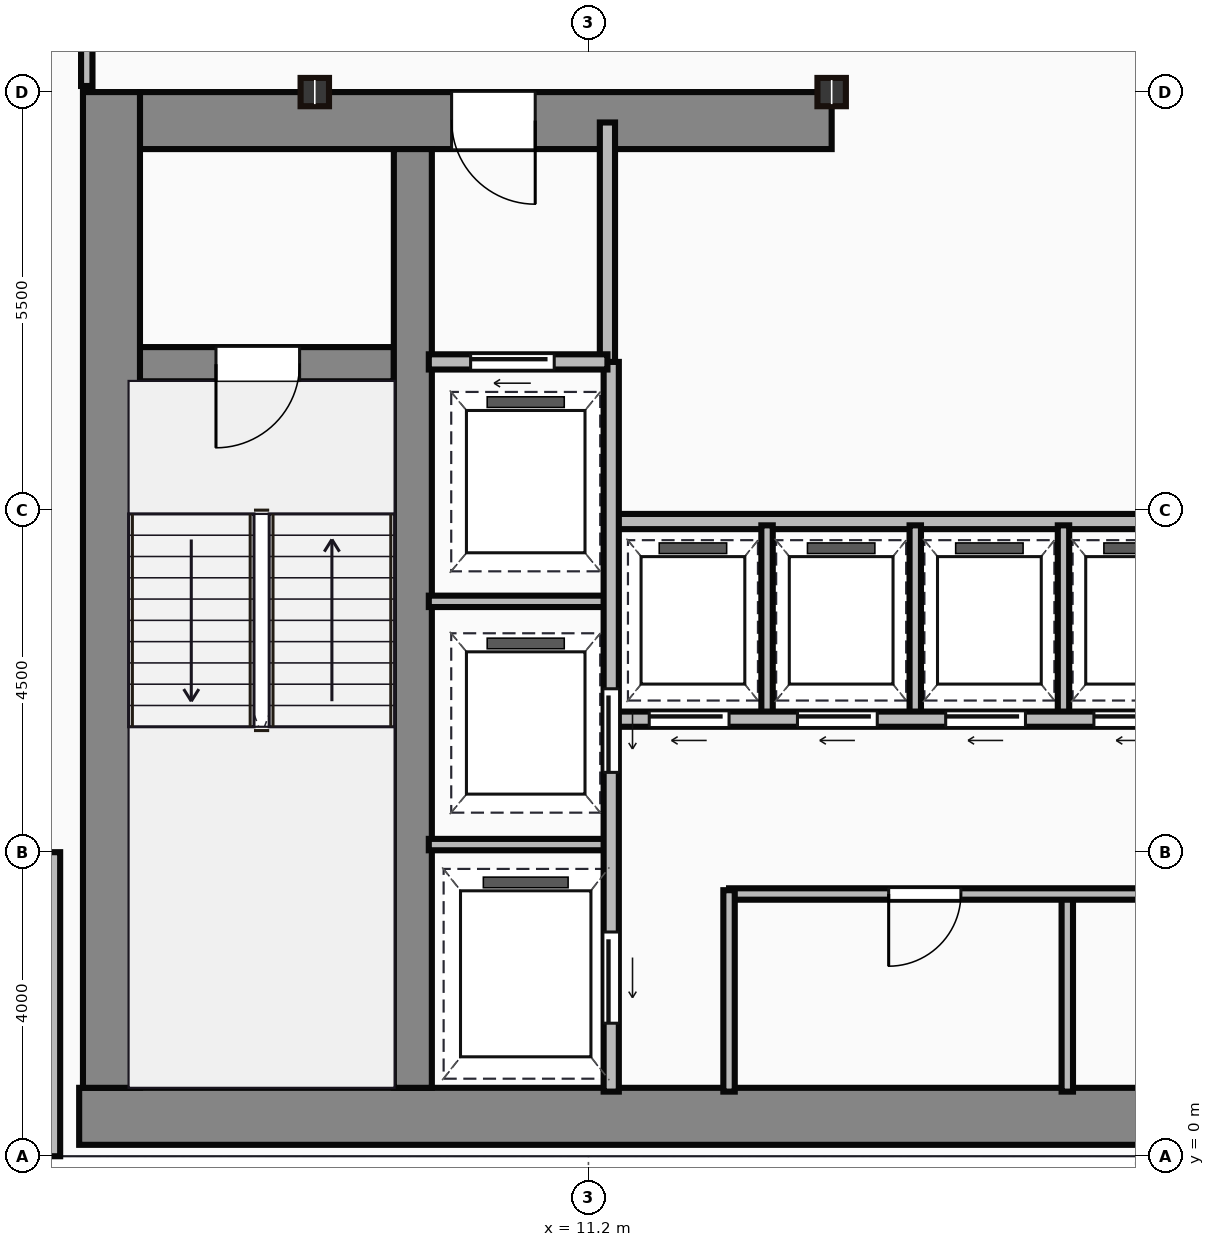
"""IFC4 building model, lengths in metres.
Left out: names, types, materials, properties, quantities, classifications, styles, units other than length and angle.
Written with IfcOpenShell. Run it as: python <this file> out.ifc"""

import sys

from ifc_helpers import new_model, si_unit, direction, frame, frame_2d, origin, origin_2d, place, context, subcontext, project, spatial, rectangle, i_section, extrude, source, transform, mapped, element, fill, save


model = new_model("IFC4")
c1 = context("Model", 3, precision=1e-05, world=origin(), true_north=direction((0.0, 1.0)))
c2 = subcontext(c1, "Body", "Model", "MODEL_VIEW")
j1 = project(units=[si_unit("LENGTHUNIT", "METRE"), si_unit("PLANEANGLEUNIT", "RADIAN")], contexts=[c1])
p1 = place(None, origin())
s1 = spatial("IfcSite", under=j1, at=p1, CompositionType="ELEMENT")
p2 = place(p1, origin())
s2 = spatial("IfcBuilding", under=s1, at=p2, CompositionType="ELEMENT")
p3 = place(p2, frame((0.0, 0.0, 144.25)))
s3 = spatial("IfcBuildingStorey", under=s2, at=p3, CompositionType="ELEMENT", Elevation=144.25)
m1 = source(origin(), c2, "Body", "SweptSolid", [
    extrude(rectangle(XDim=29.5, YDim=0.75, at=frame_2d((14.75, 0.0))), origin(), (0.0, 0.0, 1.0), 3.65),
])
p4 = place(p3, frame((4.5, 0.525, 0.0), z_axis=(0.0, 0.0, 1.0), x_axis=(1.0, 0.0, 0.0)))
e1 = element("IfcWall", 1, at=p4, inside=s3, PredefinedType="SHEAR", context=c2, shape_type="MappedRepresentation", body=[
    mapped(m1, transform((0.0, 0.0, 0.0))),
])
m2 = source(origin(), c2, "Body", "SweptSolid", [
    extrude(rectangle(XDim=13.1, YDim=0.75, at=frame_2d((6.55, 0.0))), origin(), (0.0, 0.0, 1.0), 3.65),
])
p5 = place(p3, frame((4.925, 0.9, 0.0), z_axis=(0.0, 0.0, 1.0), x_axis=(0.0, 1.0, 0.0)))
e2 = element("IfcWall", 2, at=p5, inside=s3, PredefinedType="SHEAR", context=c2, shape_type="MappedRepresentation", body=[
    mapped(m2, transform((0.0, 0.0, 0.0))),
])
m3 = source(origin(), c2, "Body", "SweptSolid", [
    extrude(rectangle(XDim=9.1, YDim=0.75, at=frame_2d((4.55, 0.0))), origin(), (0.0, 0.0, 1.0), 3.65),
])
p6 = place(p3, frame((5.3, 13.625, 0.0), z_axis=(0.0, 0.0, 1.0), x_axis=(1.0, 0.0, 0.0)))
e3 = element("IfcWall", 3, at=p6, inside=s3, PredefinedType="SHEAR", context=c2, shape_type="MappedRepresentation", body=[
    mapped(m3, transform((0.0, 0.0, 0.0))),
])
p7 = place(p6, frame((4.1, 0.0, 0.0)))
e4 = element("IfcOpeningElement", 4, at=p7, cuts=e3, PredefinedType="OPENING", context=c2, shape_type="SweptSolid", body=[
    extrude(rectangle(XDim=1.1, YDim=2.15, at=frame_2d((0.55, 1.075))), frame((0.0, 0.385, 0.0), z_axis=(0.0, -1.0, 0.0), x_axis=(1.0, 0.0, 0.0)), (0.0, 0.0, 1.0), 0.77),
])
m4 = source(origin(), c2, "Body", "SweptSolid", [
    extrude(rectangle(XDim=12.35, YDim=0.5, at=frame_2d((6.175, 0.0))), origin(), (0.0, 0.0, 1.0), 3.65),
])
p8 = place(p3, frame((8.89, 0.9, 0.0), z_axis=(0.0, 0.0, 1.0), x_axis=(0.0, 1.0, 0.0)))
e5 = element("IfcWall", 5, at=p8, inside=s3, PredefinedType="SHEAR", context=c2, shape_type="MappedRepresentation", body=[
    mapped(m4, transform((0.0, 0.0, 0.0))),
])
m5 = source(origin(), c2, "Body", "SweptSolid", [
    extrude(rectangle(XDim=3.39, YDim=0.45, at=frame_2d((1.695, 0.0))), origin(), (0.0, 0.0, 1.0), 3.65),
])
p9 = place(p3, frame((5.25, 10.42, 0.0), z_axis=(0.0, 0.0, 1.0), x_axis=(1.0, 0.0, 0.0)))
e6 = element("IfcWall", 6, at=p9, inside=s3, PredefinedType="SHEAR", context=c2, shape_type="MappedRepresentation", body=[
    mapped(m5, transform((0.0, 0.0, 0.0))),
])
p10 = place(p9, frame((1.05, 0.0, 0.0)))
e7 = element("IfcOpeningElement", 7, at=p10, cuts=e6, PredefinedType="OPENING", context=c2, shape_type="SweptSolid", body=[
    extrude(rectangle(XDim=1.1, YDim=2.15, at=frame_2d((0.55, 1.075))), frame((0.0, 0.235, 0.0), z_axis=(0.0, -1.0, 0.0), x_axis=(1.0, 0.0, 0.0)), (0.0, 0.0, 1.0), 0.47),
])
m6 = source(origin(), c2, "Body", "SweptSolid", [
    extrude(i_section(OverallWidth=0.374, OverallDepth=0.372, WebThickness=0.016, FlangeThickness=0.026, at=origin_2d()), origin(), (0.0, 0.0, 1.0), 3.65),
])
for number, where, z_axis, x_axis in (
    (8, (7.6, 14.0, 0.0), (0.0, 0.0, 1.0), (1.0, 0.0, 0.0)),
    (9, (14.4, 14.0, 0.0), (0.0, 0.0, 1.0), (1.0, 0.0, 0.0)),
):
    element("IfcColumn", number, at=place(p3, frame(where, z_axis=z_axis, x_axis=x_axis)), inside=s3, PredefinedType="COLUMN", context=c2, shape_type="MappedRepresentation", body=[
        mapped(m6, transform((0.0, 0.0, 0.0))),
    ])
m7 = source(origin(), c2, "Body", "SweptSolid", [
    extrude(rectangle(XDim=4.0, YDim=0.25, at=frame_2d((2.0, 0.0))), origin(), (0.0, 0.0, 1.0), 3.4),
])
p11 = place(p3, frame((4.125, 4.0, 0.0), z_axis=(0.0, 0.0, 1.0), x_axis=(0.0, -1.0, 0.0)))
e10 = element("IfcWall", 10, at=p11, inside=s3, PredefinedType="STANDARD", context=c2, shape_type="MappedRepresentation", body=[
    mapped(m7, transform((0.0, 0.0, 0.0))),
])
m8 = source(origin(), c2, "Body", "SweptSolid", [
    extrude(rectangle(XDim=3.18, YDim=0.2, at=frame_2d((1.59, 0.0))), origin(), (0.0, 0.0, 1.0), 3.4),
])
p12 = place(p3, frame((11.45, 10.42, 0.0), z_axis=(0.0, 0.0, 1.0), x_axis=(0.0, 1.0, 0.0)))
e11 = element("IfcWall", 11, at=p12, inside=s3, PredefinedType="PARTITIONING", context=c2, shape_type="MappedRepresentation", body=[
    mapped(m8, transform((0.0, 0.0, 0.0))),
])
m9 = source(origin(), c2, "Body", "SweptSolid", [
    extrude(rectangle(XDim=2.35, YDim=0.2, at=frame_2d((1.175, 0.0))), origin(), (0.0, 0.0, 1.0), 3.4),
])
p13 = place(p3, frame((9.1, 10.45, 0.0), z_axis=(0.0, 0.0, 1.0), x_axis=(1.0, 0.0, 0.0)))
e12 = element("IfcWall", 12, at=p13, inside=s3, PredefinedType="PARTITIONING", context=c2, shape_type="MappedRepresentation", body=[
    mapped(m9, transform((0.0, 0.0, 0.0))),
])
p14 = place(p13, frame((0.55, 0.0, 0.0)))
e13 = element("IfcOpeningElement", 13, at=p14, cuts=e12, PredefinedType="OPENING", context=c2, shape_type="SweptSolid", body=[
    extrude(rectangle(XDim=1.1, YDim=2.15, at=frame_2d((0.55, 1.075))), frame((0.0, 0.11, 0.0), z_axis=(0.0, -1.0, 0.0), x_axis=(1.0, 0.0, 0.0)), (0.0, 0.0, 1.0), 0.22),
])
m10 = source(origin(), c2, "Body", "SweptSolid", [
    extrude(rectangle(XDim=9.6, YDim=0.2, at=frame_2d((4.8, 0.0))), origin(), (0.0, 0.0, 1.0), 3.4),
])
p15 = place(p3, frame((11.5, 0.85, 0.0), z_axis=(0.0, 0.0, 1.0), x_axis=(0.0, 1.0, 0.0)))
e14 = element("IfcWall", 14, at=p15, inside=s3, PredefinedType="PARTITIONING", context=c2, shape_type="MappedRepresentation", body=[
    mapped(m10, transform((0.0, 0.0, 0.0))),
])
p16 = place(p15, frame((4.2, 0.0, 0.0)))
e15 = element("IfcOpeningElement", 15, at=p16, cuts=e14, PredefinedType="OPENING", context=c2, shape_type="SweptSolid", body=[
    extrude(rectangle(XDim=1.1, YDim=2.15, at=frame_2d((0.55, 1.075))), frame((0.0, 0.11, 0.0), z_axis=(0.0, -1.0, 0.0), x_axis=(1.0, 0.0, 0.0)), (0.0, 0.0, 1.0), 0.22),
])
p17 = place(p15, frame((0.9, 0.0, 0.0)))
e16 = element("IfcOpeningElement", 16, at=p17, cuts=e14, PredefinedType="OPENING", context=c2, shape_type="SweptSolid", body=[
    extrude(rectangle(XDim=1.2, YDim=2.15, at=frame_2d((0.6, 1.075))), frame((0.0, 0.11, 0.0), z_axis=(0.0, -1.0, 0.0), x_axis=(1.0, 0.0, 0.0)), (0.0, 0.0, 1.0), 0.22),
])
m11 = source(origin(), c2, "Body", "SweptSolid", [
    extrude(rectangle(XDim=2.4, YDim=0.15, at=frame_2d((1.2, 0.0))), origin(), (0.0, 0.0, 1.0), 3.4),
])
for number, where, z_axis, x_axis in (
    (17, (9.1, 4.1, 0.0), (0.0, 0.0, 1.0), (1.0, 0.0, 0.0)),
    (18, (9.1, 7.3, 0.0), (0.0, 0.0, 1.0), (1.0, 0.0, 0.0)),
):
    element("IfcWall", number, at=place(p3, frame(where, z_axis=z_axis, x_axis=x_axis)), inside=s3, PredefinedType="PARTITIONING", context=c2, shape_type="MappedRepresentation", body=[
        mapped(m11, transform((0.0, 0.0, 0.0))),
    ])
m12 = source(origin(), c2, "Body", "SweptSolid", [
    extrude(rectangle(XDim=2.65, YDim=0.15, at=frame_2d((1.325, 0.0))), origin(), (0.0, 0.0, 1.0), 3.4),
])
p18 = place(p3, frame((13.05, 0.85, 0.0), z_axis=(0.0, 0.0, 1.0), x_axis=(0.0, 1.0, 0.0)))
e19 = element("IfcWall", 19, at=p18, inside=s3, PredefinedType="PARTITIONING", context=c2, shape_type="MappedRepresentation", body=[
    mapped(m12, transform((0.0, 0.0, 0.0))),
])
m13 = source(origin(), c2, "Body", "SweptSolid", [
    extrude(rectangle(XDim=10.35, YDim=0.15, at=frame_2d((5.175, 0.0))), origin(), (0.0, 0.0, 1.0), 3.4),
])
p19 = place(p3, frame((13.05, 3.45, 0.0), z_axis=(0.0, 0.0, 1.0), x_axis=(1.0, 0.0, 0.0)))
e20 = element("IfcWall", 20, at=p19, inside=s3, PredefinedType="PARTITIONING", context=c2, shape_type="MappedRepresentation", body=[
    mapped(m13, transform((0.0, 0.0, 0.0))),
])
p20 = place(p19, frame((2.1, 0.0, 0.0)))
e21 = element("IfcOpeningElement", 21, at=p20, cuts=e20, PredefinedType="OPENING", context=c2, shape_type="SweptSolid", body=[
    extrude(rectangle(XDim=0.95, YDim=2.15, at=frame_2d((0.475, 1.075))), frame((0.0, 0.085, 0.0), z_axis=(0.0, -1.0, 0.0), x_axis=(1.0, 0.0, 0.0)), (0.0, 0.0, 1.0), 0.17),
])
p21 = place(p19, frame((6.8, 0.0, 0.0)))
e22 = element("IfcOpeningElement", 22, at=p21, cuts=e20, PredefinedType="OPENING", context=c2, shape_type="SweptSolid", body=[
    extrude(rectangle(XDim=0.95, YDim=2.15, at=frame_2d((0.475, 1.075))), frame((0.0, 0.085, 0.0), z_axis=(0.0, -1.0, 0.0), x_axis=(1.0, 0.0, 0.0)), (0.0, 0.0, 1.0), 0.17),
])
m14 = source(origin(), c2, "Body", "SweptSolid", [
    extrude(rectangle(XDim=2.6, YDim=0.15, at=frame_2d((1.3, 0.0))), origin(), (0.0, 0.0, 1.0), 3.4),
])
p22 = place(p3, frame((17.5, 0.85, 0.0), z_axis=(0.0, 0.0, 1.0), x_axis=(0.0, 1.0, 0.0)))
e23 = element("IfcWall", 23, at=p22, inside=s3, PredefinedType="PARTITIONING", context=c2, shape_type="MappedRepresentation", body=[
    mapped(m14, transform((0.0, 0.0, 0.0))),
])
m15 = source(origin(), c2, "Body", "SweptSolid", [
    extrude(rectangle(XDim=11.85, YDim=0.2, at=frame_2d((5.925, 0.0))), origin(), (0.0, 0.0, 1.0), 3.4),
])
p23 = place(p3, frame((11.55, 5.75, 0.0), z_axis=(0.0, 0.0, 1.0), x_axis=(1.0, 0.0, 0.0)))
e24 = element("IfcWall", 24, at=p23, inside=s3, PredefinedType="PARTITIONING", context=c2, shape_type="MappedRepresentation", body=[
    mapped(m15, transform((0.0, 0.0, 0.0))),
])
p24 = place(p23, frame((0.45, 0.0, 0.0)))
e25 = element("IfcOpeningElement", 25, at=p24, cuts=e24, PredefinedType="OPENING", context=c2, shape_type="SweptSolid", body=[
    extrude(rectangle(XDim=1.05, YDim=2.15, at=frame_2d((0.525, 1.075))), frame((0.0, 0.11, 0.0), z_axis=(0.0, -1.0, 0.0), x_axis=(1.0, 0.0, 0.0)), (0.0, 0.0, 1.0), 0.22),
])
p25 = place(p23, frame((2.4, 0.0, 0.0)))
e26 = element("IfcOpeningElement", 26, at=p25, cuts=e24, PredefinedType="OPENING", context=c2, shape_type="SweptSolid", body=[
    extrude(rectangle(XDim=1.05, YDim=2.15, at=frame_2d((0.525, 1.075))), frame((0.0, 0.11, 0.0), z_axis=(0.0, -1.0, 0.0), x_axis=(1.0, 0.0, 0.0)), (0.0, 0.0, 1.0), 0.22),
])
p26 = place(p23, frame((4.35, 0.0, 0.0)))
e27 = element("IfcOpeningElement", 27, at=p26, cuts=e24, PredefinedType="OPENING", context=c2, shape_type="SweptSolid", body=[
    extrude(rectangle(XDim=1.05, YDim=2.15, at=frame_2d((0.525, 1.075))), frame((0.0, 0.11, 0.0), z_axis=(0.0, -1.0, 0.0), x_axis=(1.0, 0.0, 0.0)), (0.0, 0.0, 1.0), 0.22),
])
p27 = place(p23, frame((6.3, 0.0, 0.0)))
e28 = element("IfcOpeningElement", 28, at=p27, cuts=e24, PredefinedType="OPENING", context=c2, shape_type="SweptSolid", body=[
    extrude(rectangle(XDim=1.05, YDim=2.15, at=frame_2d((0.525, 1.075))), frame((0.0, 0.11, 0.0), z_axis=(0.0, -1.0, 0.0), x_axis=(1.0, 0.0, 0.0)), (0.0, 0.0, 1.0), 0.22),
])
p28 = place(p23, frame((8.25, 0.0, 0.0)))
e29 = element("IfcOpeningElement", 29, at=p28, cuts=e24, PredefinedType="OPENING", context=c2, shape_type="SweptSolid", body=[
    extrude(rectangle(XDim=1.05, YDim=2.15, at=frame_2d((0.525, 1.075))), frame((0.0, 0.11, 0.0), z_axis=(0.0, -1.0, 0.0), x_axis=(1.0, 0.0, 0.0)), (0.0, 0.0, 1.0), 0.22),
])
p29 = place(p23, frame((10.2, 0.0, 0.0)))
e30 = element("IfcOpeningElement", 30, at=p29, cuts=e24, PredefinedType="OPENING", context=c2, shape_type="SweptSolid", body=[
    extrude(rectangle(XDim=1.05, YDim=2.15, at=frame_2d((0.525, 1.075))), frame((0.0, 0.11, 0.0), z_axis=(0.0, -1.0, 0.0), x_axis=(1.0, 0.0, 0.0)), (0.0, 0.0, 1.0), 0.22),
])
p30 = place(p3, frame((11.55, 8.35, 0.0), z_axis=(0.0, 0.0, 1.0), x_axis=(1.0, 0.0, 0.0)))
e31 = element("IfcWall", 31, at=p30, inside=s3, PredefinedType="PARTITIONING", context=c2, shape_type="MappedRepresentation", body=[
    mapped(m15, transform((0.0, 0.0, 0.0))),
])
m16 = source(origin(), c2, "Body", "SweptSolid", [
    extrude(rectangle(XDim=2.5, YDim=0.15, at=frame_2d((1.25, 0.0))), origin(), (0.0, 0.0, 1.0), 3.4),
])
for number, where, z_axis, x_axis in (
    (32, (13.55, 5.8, 0.0), (0.0, 0.0, 1.0), (0.0, 1.0, 0.0)),
    (33, (15.5, 5.8, 0.0), (0.0, 0.0, 1.0), (0.0, 1.0, 0.0)),
    (34, (17.45, 5.8, 0.0), (0.0, 0.0, 1.0), (0.0, 1.0, 0.0)),
):
    element("IfcWall", number, at=place(p3, frame(where, z_axis=z_axis, x_axis=x_axis)), inside=s3, PredefinedType="PARTITIONING", context=c2, shape_type="MappedRepresentation", body=[
        mapped(m16, transform((0.0, 0.0, 0.0))),
    ])
m17 = source(origin(), c2, "Body", "SweptSolid", [
    extrude(rectangle(XDim=2.22, YDim=0.15, at=frame_2d((1.11, 0.0))), origin(), (0.0, 0.0, 1.0), 3.4),
])
p31 = place(p3, frame((4.6, 14.08, 0.0), z_axis=(0.0, 0.0, 1.0), x_axis=(0.0, 1.0, 0.0)))
e35 = element("IfcWall", 35, at=p31, inside=s3, PredefinedType="PARTITIONING", context=c2, shape_type="MappedRepresentation", body=[
    mapped(m17, transform((0.0, 0.0, 0.0))),
])
m18 = source(origin(), c2, "Body", "SweptSolid", [
    extrude(rectangle(XDim=1.1, YDim=2.15, at=frame_2d((0.55, 1.075))), frame((0.0, 0.025, 0.0), z_axis=(0.0, -1.0, 0.0), x_axis=(1.0, 0.0, 0.0)), (0.0, 0.0, 1.0), 0.05),
])
p32 = place(p10, frame((1.1, 0.0, 0.0), z_axis=(0.0, 0.0, 1.0), x_axis=(-1.0, 0.0, 0.0)))
e36 = element("IfcDoor", 36, at=p32, inside=s3, OperationType="SINGLE_SWING_LEFT", PredefinedType="DOOR", context=c2, shape_type="MappedRepresentation", body=[
    mapped(m18, transform((0.0, 0.0, 0.0))),
])
fill(e7, e36)
p33 = place(p7, origin())
e37 = element("IfcDoor", 37, at=p33, inside=s3, OperationType="SINGLE_SWING_RIGHT", PredefinedType="DOOR", context=c2, shape_type="MappedRepresentation", body=[
    mapped(m18, transform((0.0, 0.0, 0.0))),
])
fill(e4, e37)
p34 = place(p14, origin())
e38 = element("IfcDoor", 38, at=p34, inside=s3, OperationType="SLIDING_TO_LEFT", PredefinedType="DOOR", context=c2, shape_type="MappedRepresentation", body=[
    mapped(m18, transform((0.0, 0.0, 0.0))),
])
fill(e13, e38)
p35 = place(p16, frame((1.1, 0.0, 0.0), z_axis=(0.0, 0.0, 1.0), x_axis=(-1.0, 0.0, 0.0)))
e39 = element("IfcDoor", 39, at=p35, inside=s3, OperationType="SLIDING_TO_LEFT", PredefinedType="DOOR", context=c2, shape_type="MappedRepresentation", body=[
    mapped(m18, transform((0.0, 0.0, 0.0))),
])
fill(e15, e39)
m19 = source(origin(), c2, "Body", "SweptSolid", [
    extrude(rectangle(XDim=1.2, YDim=2.15, at=frame_2d((0.6, 1.075))), frame((0.0, 0.025, 0.0), z_axis=(0.0, -1.0, 0.0), x_axis=(1.0, 0.0, 0.0)), (0.0, 0.0, 1.0), 0.05),
])
p36 = place(p17, frame((1.2, 0.0, 0.0), z_axis=(0.0, 0.0, 1.0), x_axis=(-1.0, 0.0, 0.0)))
e40 = element("IfcDoor", 40, at=p36, inside=s3, OperationType="SLIDING_TO_LEFT", PredefinedType="DOOR", context=c2, shape_type="MappedRepresentation", body=[
    mapped(m19, transform((0.0, 0.0, 0.0))),
])
fill(e16, e40)
m20 = source(origin(), c2, "Body", "SweptSolid", [
    extrude(rectangle(XDim=0.95, YDim=2.15, at=frame_2d((0.475, 1.075))), frame((0.0, 0.025, 0.0), z_axis=(0.0, -1.0, 0.0), x_axis=(1.0, 0.0, 0.0)), (0.0, 0.0, 1.0), 0.05),
])
p37 = place(p20, origin())
e41 = element("IfcDoor", 41, at=p37, inside=s3, OperationType="SINGLE_SWING_LEFT", PredefinedType="DOOR", context=c2, shape_type="MappedRepresentation", body=[
    mapped(m20, transform((0.0, 0.0, 0.0))),
])
fill(e21, e41)
m21 = source(origin(), c2, "Body", "SweptSolid", [
    extrude(rectangle(XDim=1.05, YDim=2.15, at=frame_2d((0.525, 1.075))), frame((0.0, 0.025, 0.0), z_axis=(0.0, -1.0, 0.0), x_axis=(1.0, 0.0, 0.0)), (0.0, 0.0, 1.0), 0.05),
])
p38 = place(p24, frame((1.05, 0.0, 0.0), z_axis=(0.0, 0.0, 1.0), x_axis=(-1.0, 0.0, 0.0)))
e42 = element("IfcDoor", 42, at=p38, inside=s3, OperationType="SLIDING_TO_LEFT", PredefinedType="DOOR", context=c2, shape_type="MappedRepresentation", body=[
    mapped(m21, transform((0.0, 0.0, 0.0))),
])
fill(e25, e42)
p39 = place(p25, frame((1.05, 0.0, 0.0), z_axis=(0.0, 0.0, 1.0), x_axis=(-1.0, 0.0, 0.0)))
e43 = element("IfcDoor", 43, at=p39, inside=s3, OperationType="SLIDING_TO_LEFT", PredefinedType="DOOR", context=c2, shape_type="MappedRepresentation", body=[
    mapped(m21, transform((0.0, 0.0, 0.0))),
])
fill(e26, e43)
p40 = place(p26, frame((1.05, 0.0, 0.0), z_axis=(0.0, 0.0, 1.0), x_axis=(-1.0, 0.0, 0.0)))
e44 = element("IfcDoor", 44, at=p40, inside=s3, OperationType="SLIDING_TO_LEFT", PredefinedType="DOOR", context=c2, shape_type="MappedRepresentation", body=[
    mapped(m21, transform((0.0, 0.0, 0.0))),
])
fill(e27, e44)
p41 = place(p27, frame((1.05, 0.0, 0.0), z_axis=(0.0, 0.0, 1.0), x_axis=(-1.0, 0.0, 0.0)))
e45 = element("IfcDoor", 45, at=p41, inside=s3, OperationType="SLIDING_TO_LEFT", PredefinedType="DOOR", context=c2, shape_type="MappedRepresentation", body=[
    mapped(m21, transform((0.0, 0.0, 0.0))),
])
fill(e28, e45)
save(model, sys.argv[1])
